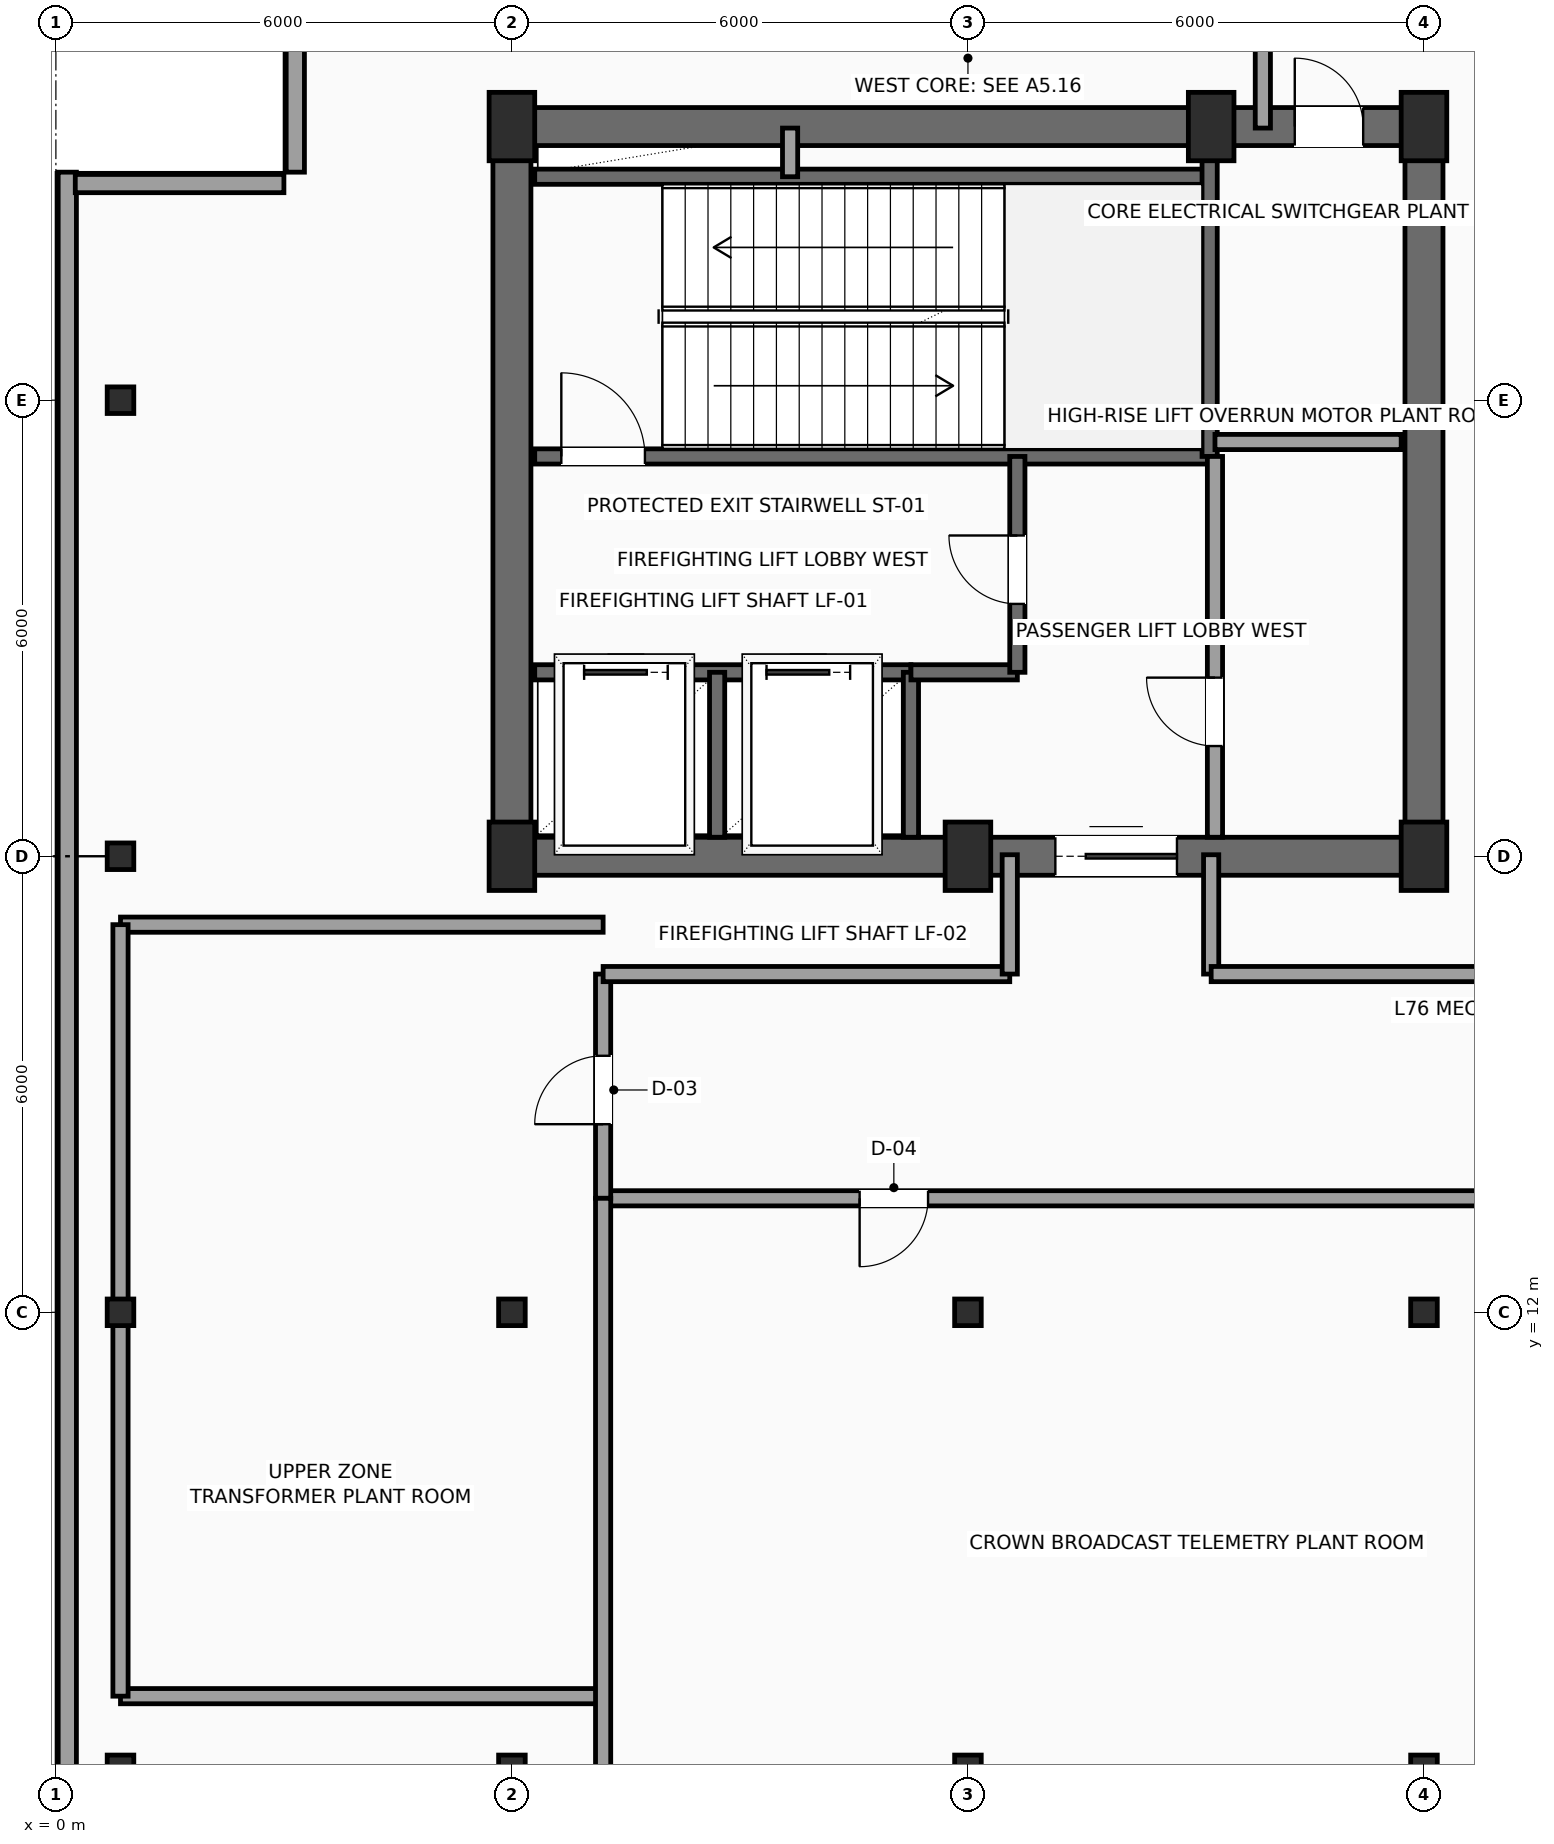
"""IFC4 building model, lengths in metres.
Left out: names, types, materials, properties, quantities, classifications, styles, units other than length and angle.
Written with IfcOpenShell. Run it as: python <this file> out.ifc"""

import sys

from ifc_helpers import new_model, si_unit, direction, frame, frame_2d, origin, origin_2d, place, context, subcontext, project, spatial, rectangle, hollow_rectangle, extrude, element, fill, save


model = new_model("IFC4")
c1 = context("Model", 3, precision=1e-05, world=origin(), true_north=direction((0.0, 1.0)))
c2 = subcontext(c1, "Body", "Model", "MODEL_VIEW")
j1 = project(units=[si_unit("LENGTHUNIT", "METRE"), si_unit("PLANEANGLEUNIT", "RADIAN")], contexts=[c1])
p1 = place(None, origin())
s1 = spatial("IfcSite", under=j1, at=p1, CompositionType="ELEMENT")
p2 = place(p1, origin())
s2 = spatial("IfcBuilding", under=s1, at=p2, CompositionType="ELEMENT")
p3 = place(p2, frame((0.0, 0.0, 300.9)))
s3 = spatial("IfcBuildingStorey", under=s2, at=p3, CompositionType="ELEMENT", Elevation=300.9)
for number, where, z_axis, x_axis in (
    (1, (6.0, 18.0, 0.0), (0.0, 0.0, 1.0), (1.0, 0.0, 0.0)),
    (2, (12.0, 18.0, 0.0), (0.0, 0.0, 1.0), (1.0, 0.0, 0.0)),
    (3, (18.0, 18.0, 0.0), (0.0, 0.0, 1.0), (1.0, 0.0, 0.0)),
    (4, (6.0, 27.6, 0.0), (0.0, 0.0, 1.0), (1.0, 0.0, 0.0)),
    (5, (15.2, 27.6, 0.0), (0.0, 0.0, 1.0), (1.0, 0.0, 0.0)),
    (6, (18.0, 27.6, 0.0), (0.0, 0.0, 1.0), (1.0, 0.0, 0.0)),
):
    element("IfcColumn", number, at=place(p3, frame(where, z_axis=z_axis, x_axis=x_axis)), inside=s3, PredefinedType="COLUMN", context=c2, shape_type="SweptSolid", body=[
        extrude(rectangle(XDim=0.6, YDim=0.9, at=origin_2d()), origin(), (0.0, 0.0, 1.0), 4.8),
    ])
for number, where, z_axis, x_axis in (
    (7, (0.85, 6.0, 0.0), (0.0, 0.0, 1.0), (1.0, 0.0, 0.0)),
    (8, (0.85, 12.0, 0.0), (0.0, 0.0, 1.0), (1.0, 0.0, 0.0)),
    (9, (0.85, 18.0, 0.0), (0.0, 0.0, 1.0), (1.0, 0.0, 0.0)),
    (10, (0.85, 24.0, 0.0), (0.0, 0.0, 1.0), (1.0, 0.0, 0.0)),
    (11, (6.0, 6.0, 0.0), (0.0, 0.0, 1.0), (1.0, 0.0, 0.0)),
    (12, (6.0, 12.0, 0.0), (0.0, 0.0, 1.0), (1.0, 0.0, 0.0)),
    (13, (12.0, 6.0, 0.0), (0.0, 0.0, 1.0), (1.0, 0.0, 0.0)),
    (14, (12.0, 12.0, 0.0), (0.0, 0.0, 1.0), (1.0, 0.0, 0.0)),
    (15, (18.0, 6.0, 0.0), (0.0, 0.0, 1.0), (1.0, 0.0, 0.0)),
    (16, (18.0, 12.0, 0.0), (0.0, 0.0, 1.0), (1.0, 0.0, 0.0)),
):
    element("IfcColumn", number, at=place(p3, frame(where, z_axis=z_axis, x_axis=x_axis)), inside=s3, PredefinedType="COLUMN", context=c2, shape_type="SweptSolid", body=[
        extrude(hollow_rectangle(XDim=0.35, YDim=0.35, WallThickness=0.016, InnerFilletRadius=0.016, OuterFilletRadius=0.032, at=origin_2d()), origin(), (0.0, 0.0, 1.0), 4.8),
    ])
p4 = place(p3, frame((0.15, 3.0, 0.0), z_axis=(0.0, 0.0, 1.0), x_axis=(0.0, 1.0, 0.0)))
e17 = element("IfcWall", 17, at=p4, inside=s3, PredefinedType="SOLIDWALL", context=c2, shape_type="SweptSolid", body=[
    extrude(rectangle(XDim=24.0, YDim=0.24, at=frame_2d((12.0, 0.0))), origin(), (0.0, 0.0, 1.0), 4.525),
])
for number, where, z_axis, x_axis in (
    (18, (0.255, 26.85, 0.0), (0.0, 0.0, 1.0), (1.0, 0.0, 0.0)),
    (19, (3.15, 27.0, 0.0), (0.0, 0.0, 1.0), (0.0, 1.0, 0.0)),
):
    element("IfcWall", number, at=place(p3, frame(where, z_axis=z_axis, x_axis=x_axis)), inside=s3, PredefinedType="SOLIDWALL", context=c2, shape_type="SweptSolid", body=[
        extrude(rectangle(XDim=2.745, YDim=0.24, at=frame_2d((1.373, 0.0))), origin(), (0.0, 0.0, 1.0), 4.525),
    ])
p5 = place(p3, frame((6.0, 18.0, 0.0), z_axis=(0.0, 0.0, 1.0), x_axis=(1.0, 0.0, 0.0)))
e20 = element("IfcWall", 20, at=p5, inside=s3, PredefinedType="SHEAR", context=c2, shape_type="SweptSolid", body=[
    extrude(rectangle(XDim=12.0, YDim=0.5, at=frame_2d((6.0, 0.0))), origin(), (0.0, 0.0, 1.0), 4.525),
])
p6 = place(p5, frame((7.15, 0.0, 0.0)))
e21 = element("IfcOpeningElement", 21, at=p6, cuts=e20, PredefinedType="OPENING", context=c2, shape_type="SweptSolid", body=[
    extrude(rectangle(XDim=1.6, YDim=2.3, at=frame_2d((0.8, 1.15))), frame((0.0, 0.26, 0.0), z_axis=(0.0, -1.0, 0.0), x_axis=(1.0, 0.0, 0.0)), (0.0, 0.0, 1.0), 0.52),
])
p7 = place(p3, frame((6.0, 27.6, 0.0), z_axis=(0.0, 0.0, 1.0), x_axis=(1.0, 0.0, 0.0)))
e22 = element("IfcWall", 22, at=p7, inside=s3, PredefinedType="SHEAR", context=c2, shape_type="SweptSolid", body=[
    extrude(rectangle(XDim=12.0, YDim=0.5, at=frame_2d((6.0, 0.0))), origin(), (0.0, 0.0, 1.0), 4.525),
])
p8 = place(p7, frame((10.3, 0.0, 0.0)))
e23 = element("IfcOpeningElement", 23, at=p8, cuts=e22, PredefinedType="OPENING", context=c2, shape_type="SweptSolid", body=[
    extrude(rectangle(XDim=0.9, YDim=2.15, at=frame_2d((0.45, 1.075))), frame((0.0, 0.26, 0.0), z_axis=(0.0, -1.0, 0.0), x_axis=(1.0, 0.0, 0.0)), (0.0, 0.0, 1.0), 0.52),
])
for number, where, z_axis, x_axis in (
    (24, (6.0, 18.0, 0.0), (0.0, 0.0, 1.0), (0.0, 1.0, 0.0)),
    (25, (18.0, 18.0, 0.0), (0.0, 0.0, 1.0), (0.0, 1.0, 0.0)),
):
    element("IfcWall", number, at=place(p3, frame(where, z_axis=z_axis, x_axis=x_axis)), inside=s3, PredefinedType="SHEAR", context=c2, shape_type="SweptSolid", body=[
        extrude(rectangle(XDim=9.6, YDim=0.5, at=frame_2d((4.8, 0.0))), origin(), (0.0, 0.0, 1.0), 4.525),
    ])
p9 = place(p3, frame((6.3, 23.26, 0.0), z_axis=(0.0, 0.0, 1.0), x_axis=(1.0, 0.0, 0.0)))
e26 = element("IfcWall", 26, at=p9, inside=s3, PredefinedType="SHEAR", context=c2, shape_type="SweptSolid", body=[
    extrude(rectangle(XDim=8.88, YDim=0.2, at=frame_2d((4.44, 0.0))), origin(), (0.0, 0.0, 1.0), 4.525),
])
p10 = place(p9, frame((0.35, 0.0, 0.0)))
e27 = element("IfcOpeningElement", 27, at=p10, cuts=e26, PredefinedType="OPENING", context=c2, shape_type="SweptSolid", body=[
    extrude(rectangle(XDim=1.1, YDim=2.2, at=frame_2d((0.55, 1.1))), frame((0.0, 0.11, 0.0), z_axis=(0.0, -1.0, 0.0), x_axis=(1.0, 0.0, 0.0)), (0.0, 0.0, 1.0), 0.22),
])
p11 = place(p3, frame((6.3, 26.94, 0.0), z_axis=(0.0, 0.0, 1.0), x_axis=(1.0, 0.0, 0.0)))
e28 = element("IfcWall", 28, at=p11, inside=s3, PredefinedType="SHEAR", context=c2, shape_type="SweptSolid", body=[
    extrude(rectangle(XDim=8.88, YDim=0.2, at=frame_2d((4.44, 0.0))), origin(), (0.0, 0.0, 1.0), 4.525),
])
p12 = place(p3, frame((15.18, 23.26, 0.0), z_axis=(0.0, 0.0, 1.0), x_axis=(0.0, 1.0, 0.0)))
e29 = element("IfcWall", 29, at=p12, inside=s3, PredefinedType="SHEAR", context=c2, shape_type="SweptSolid", body=[
    extrude(rectangle(XDim=4.04, YDim=0.2, at=frame_2d((2.02, 0.0))), origin(), (0.0, 0.0, 1.0), 4.525),
])
p13 = place(p3, frame((6.3, 20.42, 0.0), z_axis=(0.0, 0.0, 1.0), x_axis=(1.0, 0.0, 0.0)))
e30 = element("IfcWall", 30, at=p13, inside=s3, PredefinedType="SHEAR", context=c2, shape_type="SweptSolid", body=[
    extrude(rectangle(XDim=4.95, YDim=0.2, at=frame_2d((2.475, 0.0))), origin(), (0.0, 0.0, 1.0), 4.525),
])
p14 = place(p13, frame((0.65, 0.0, 0.0)))
e31 = element("IfcOpeningElement", 31, at=p14, cuts=e30, PredefinedType="OPENING", context=c2, shape_type="SweptSolid", body=[
    extrude(rectangle(XDim=1.1, YDim=2.2, at=frame_2d((0.55, 1.1))), frame((0.0, 0.11, 0.0), z_axis=(0.0, -1.0, 0.0), x_axis=(1.0, 0.0, 0.0)), (0.0, 0.0, 1.0), 0.22),
])
p15 = place(p13, frame((3.05, 0.0, 0.0)))
e32 = element("IfcOpeningElement", 32, at=p15, cuts=e30, PredefinedType="OPENING", context=c2, shape_type="SweptSolid", body=[
    extrude(rectangle(XDim=1.1, YDim=2.2, at=frame_2d((0.55, 1.1))), frame((0.0, 0.11, 0.0), z_axis=(0.0, -1.0, 0.0), x_axis=(1.0, 0.0, 0.0)), (0.0, 0.0, 1.0), 0.22),
])
for number, where, z_axis, x_axis in (
    (33, (8.7, 18.25, 0.0), (0.0, 0.0, 1.0), (0.0, 1.0, 0.0)),
    (34, (11.25, 18.25, 0.0), (0.0, 0.0, 1.0), (0.0, 1.0, 0.0)),
):
    element("IfcWall", number, at=place(p3, frame(where, z_axis=z_axis, x_axis=x_axis)), inside=s3, PredefinedType="SHEAR", context=c2, shape_type="SweptSolid", body=[
        extrude(rectangle(XDim=2.17, YDim=0.2, at=frame_2d((1.085, 0.0))), origin(), (0.0, 0.0, 1.0), 4.525),
    ])
p16 = place(p3, frame((11.25, 20.42, 0.0), z_axis=(0.0, 0.0, 1.0), x_axis=(1.0, 0.0, 0.0)))
e35 = element("IfcWall", 35, at=p16, inside=s3, PredefinedType="SHEAR", context=c2, shape_type="SweptSolid", body=[
    extrude(rectangle(XDim=1.4, YDim=0.2, at=frame_2d((0.7, 0.0))), origin(), (0.0, 0.0, 1.0), 4.525),
])
p17 = place(p3, frame((12.65, 20.42, 0.0), z_axis=(0.0, 0.0, 1.0), x_axis=(0.0, 1.0, 0.0)))
e36 = element("IfcWall", 36, at=p17, inside=s3, PredefinedType="SHEAR", context=c2, shape_type="SweptSolid", body=[
    extrude(rectangle(XDim=2.84, YDim=0.2, at=frame_2d((1.42, 0.0))), origin(), (0.0, 0.0, 1.0), 4.525),
])
p18 = place(p17, frame((0.9, 0.0, 0.0)))
e37 = element("IfcOpeningElement", 37, at=p18, cuts=e36, PredefinedType="OPENING", context=c2, shape_type="SweptSolid", body=[
    extrude(rectangle(XDim=0.9, YDim=2.15, at=frame_2d((0.45, 1.075))), frame((0.0, 0.11, 0.0), z_axis=(0.0, -1.0, 0.0), x_axis=(1.0, 0.0, 0.0)), (0.0, 0.0, 1.0), 0.22),
])
p19 = place(p3, frame((9.66, 26.94, 0.0), z_axis=(0.0, 0.0, 1.0), x_axis=(0.0, 1.0, 0.0)))
e38 = element("IfcWall", 38, at=p19, inside=s3, PredefinedType="SOLIDWALL", context=c2, shape_type="SweptSolid", body=[
    extrude(rectangle(XDim=0.64, YDim=0.2, at=frame_2d((0.32, 0.0))), origin(), (0.0, 0.0, 1.0), 4.525),
])
p20 = place(p3, frame((15.25, 18.25, 0.0), z_axis=(0.0, 0.0, 1.0), x_axis=(0.0, 1.0, 0.0)))
e39 = element("IfcWall", 39, at=p20, inside=s3, PredefinedType="SOLIDWALL", context=c2, shape_type="SweptSolid", body=[
    extrude(rectangle(XDim=5.01, YDim=0.2, at=frame_2d((2.505, 0.0))), origin(), (0.0, 0.0, 1.0), 4.525),
])
p21 = place(p20, frame((1.2, 0.0, 0.0)))
e40 = element("IfcOpeningElement", 40, at=p21, cuts=e39, PredefinedType="OPENING", context=c2, shape_type="SweptSolid", body=[
    extrude(rectangle(XDim=0.9, YDim=2.15, at=frame_2d((0.45, 1.075))), frame((0.0, 0.11, 0.0), z_axis=(0.0, -1.0, 0.0), x_axis=(1.0, 0.0, 0.0)), (0.0, 0.0, 1.0), 0.22),
])
p22 = place(p3, frame((15.25, 23.45, 0.0), z_axis=(0.0, 0.0, 1.0), x_axis=(1.0, 0.0, 0.0)))
e41 = element("IfcWall", 41, at=p22, inside=s3, PredefinedType="SOLIDWALL", context=c2, shape_type="SweptSolid", body=[
    extrude(rectangle(XDim=2.45, YDim=0.2, at=frame_2d((1.225, 0.0))), origin(), (0.0, 0.0, 1.0), 4.525),
])
p23 = place(p3, frame((20.75, 13.5, 0.0), z_axis=(0.0, 0.0, 1.0), x_axis=(-1.0, 0.0, 0.0)))
e42 = element("IfcWall", 42, at=p23, inside=s3, PredefinedType="SOLIDWALL", context=c2, shape_type="SweptSolid", body=[
    extrude(rectangle(XDim=13.55, YDim=0.2, at=frame_2d((6.775, 0.0))), origin(), (0.0, 0.0, 1.0), 4.525),
])
p24 = place(p23, frame((9.275, 0.0, 0.0)))
e43 = element("IfcOpeningElement", 43, at=p24, cuts=e42, PredefinedType="OPENING", context=c2, shape_type="SweptSolid", body=[
    extrude(rectangle(XDim=0.9, YDim=2.15, at=frame_2d((0.45, 1.075))), frame((0.0, 0.11, 0.0), z_axis=(0.0, -1.0, 0.0), x_axis=(1.0, 0.0, 0.0)), (0.0, 0.0, 1.0), 0.22),
])
p25 = place(p3, frame((7.2, 13.5, 0.0), z_axis=(0.0, 0.0, 1.0), x_axis=(0.0, 1.0, 0.0)))
e44 = element("IfcWall", 44, at=p25, inside=s3, PredefinedType="SOLIDWALL", context=c2, shape_type="SweptSolid", body=[
    extrude(rectangle(XDim=2.95, YDim=0.2, at=frame_2d((1.475, 0.0))), origin(), (0.0, 0.0, 1.0), 4.525),
])
p26 = place(p25, frame((0.975, 0.0, 0.0)))
e45 = element("IfcOpeningElement", 45, at=p26, cuts=e44, PredefinedType="OPENING", context=c2, shape_type="SweptSolid", body=[
    extrude(rectangle(XDim=0.9, YDim=2.15, at=frame_2d((0.45, 1.075))), frame((0.0, 0.11, 0.0), z_axis=(0.0, -1.0, 0.0), x_axis=(1.0, 0.0, 0.0)), (0.0, 0.0, 1.0), 0.22),
])
p27 = place(p3, frame((7.2, 16.45, 0.0), z_axis=(0.0, 0.0, 1.0), x_axis=(1.0, 0.0, 0.0)))
e46 = element("IfcWall", 46, at=p27, inside=s3, PredefinedType="SOLIDWALL", context=c2, shape_type="SweptSolid", body=[
    extrude(rectangle(XDim=5.35, YDim=0.2, at=frame_2d((2.675, 0.0))), origin(), (0.0, 0.0, 1.0), 4.525),
])
for number, where, z_axis, x_axis in (
    (47, (12.55, 16.45, 0.0), (0.0, 0.0, 1.0), (0.0, 1.0, 0.0)),
    (48, (15.2, 18.02, 0.0), (0.0, 0.0, 1.0), (0.0, -1.0, 0.0)),
):
    element("IfcWall", number, at=place(p3, frame(where, z_axis=z_axis, x_axis=x_axis)), inside=s3, PredefinedType="SOLIDWALL", context=c2, shape_type="SweptSolid", body=[
        extrude(rectangle(XDim=1.57, YDim=0.2, at=frame_2d((0.785, 0.0))), origin(), (0.0, 0.0, 1.0), 4.525),
    ])
p28 = place(p3, frame((15.2, 16.45, 0.0), z_axis=(0.0, 0.0, 1.0), x_axis=(1.0, 0.0, 0.0)))
e49 = element("IfcWall", 49, at=p28, inside=s3, PredefinedType="SOLIDWALL", context=c2, shape_type="SweptSolid", body=[
    extrude(rectangle(XDim=3.75, YDim=0.2, at=frame_2d((1.875, 0.0))), origin(), (0.0, 0.0, 1.0), 4.525),
])
p29 = place(p3, frame((15.88, 27.58, 0.0), z_axis=(0.0, 0.0, 1.0), x_axis=(0.0, 1.0, 0.0)))
e50 = element("IfcWall", 50, at=p29, inside=s3, PredefinedType="SOLIDWALL", context=c2, shape_type="SweptSolid", body=[
    extrude(rectangle(XDim=2.12, YDim=0.2, at=frame_2d((1.06, 0.0))), origin(), (0.0, 0.0, 1.0), 4.525),
])
for number, where, z_axis, x_axis in (
    (51, (0.85, 6.95, 0.0), (0.0, 0.0, 1.0), (1.0, 0.0, 0.0)),
    (52, (0.85, 17.1, 0.0), (0.0, 0.0, 1.0), (1.0, 0.0, 0.0)),
):
    element("IfcWall", number, at=place(p3, frame(where, z_axis=z_axis, x_axis=x_axis)), inside=s3, PredefinedType="SOLIDWALL", context=c2, shape_type="SweptSolid", body=[
        extrude(rectangle(XDim=6.35, YDim=0.2, at=frame_2d((3.175, 0.0))), origin(), (0.0, 0.0, 1.0), 4.525),
    ])
p30 = place(p3, frame((0.85, 6.95, 0.0), z_axis=(0.0, 0.0, 1.0), x_axis=(0.0, 1.0, 0.0)))
e53 = element("IfcWall", 53, at=p30, inside=s3, PredefinedType="SOLIDWALL", context=c2, shape_type="SweptSolid", body=[
    extrude(rectangle(XDim=10.15, YDim=0.2, at=frame_2d((5.075, 0.0))), origin(), (0.0, 0.0, 1.0), 4.217),
])
p31 = place(p3, frame((7.2, 1.75, 0.0), z_axis=(0.0, 0.0, 1.0), x_axis=(0.0, 1.0, 0.0)))
e54 = element("IfcWall", 54, at=p31, inside=s3, PredefinedType="SOLIDWALL", context=c2, shape_type="SweptSolid", body=[
    extrude(rectangle(XDim=11.75, YDim=0.2, at=frame_2d((5.875, 0.0))), origin(), (0.0, 0.0, 1.0), 4.525),
])
p32 = place(p6, origin())
e55 = element("IfcDoor", 55, at=p32, inside=s3, OperationType="DOUBLE_DOOR_SLIDING", PredefinedType="DOOR", context=c2, shape_type="SweptSolid", body=[
    extrude(rectangle(XDim=1.6, YDim=2.3, at=frame_2d((0.8, 1.15))), frame((0.0, 0.025, 0.0), z_axis=(0.0, -1.0, 0.0), x_axis=(1.0, 0.0, 0.0)), (0.0, 0.0, 1.0), 0.05),
])
fill(e21, e55)
p33 = place(p8, origin())
e56 = element("IfcDoor", 56, at=p33, inside=s3, OperationType="SINGLE_SWING_LEFT", PredefinedType="DOOR", context=c2, shape_type="SweptSolid", body=[
    extrude(rectangle(XDim=0.9, YDim=2.15, at=frame_2d((0.45, 1.075))), frame((0.0, 0.025, 0.0), z_axis=(0.0, -1.0, 0.0), x_axis=(1.0, 0.0, 0.0)), (0.0, 0.0, 1.0), 0.05),
])
fill(e23, e56)
p34 = place(p10, origin())
e57 = element("IfcDoor", 57, at=p34, inside=s3, OperationType="SINGLE_SWING_LEFT", PredefinedType="DOOR", context=c2, shape_type="SweptSolid", body=[
    extrude(rectangle(XDim=1.1, YDim=2.2, at=frame_2d((0.55, 1.1))), frame((0.0, 0.025, 0.0), z_axis=(0.0, -1.0, 0.0), x_axis=(1.0, 0.0, 0.0)), (0.0, 0.0, 1.0), 0.05),
])
fill(e27, e57)
p35 = place(p14, origin())
e58 = element("IfcDoor", 58, at=p35, inside=s3, OperationType="SLIDING_TO_LEFT", PredefinedType="DOOR", context=c2, shape_type="SweptSolid", body=[
    extrude(rectangle(XDim=1.1, YDim=2.2, at=frame_2d((0.55, 1.1))), frame((0.0, 0.025, 0.0), z_axis=(0.0, -1.0, 0.0), x_axis=(1.0, 0.0, 0.0)), (0.0, 0.0, 1.0), 0.05),
])
fill(e31, e58)
p36 = place(p15, origin())
e59 = element("IfcDoor", 59, at=p36, inside=s3, OperationType="SLIDING_TO_LEFT", PredefinedType="DOOR", context=c2, shape_type="SweptSolid", body=[
    extrude(rectangle(XDim=1.1, YDim=2.2, at=frame_2d((0.55, 1.1))), frame((0.0, 0.025, 0.0), z_axis=(0.0, -1.0, 0.0), x_axis=(1.0, 0.0, 0.0)), (0.0, 0.0, 1.0), 0.05),
])
fill(e32, e59)
p37 = place(p18, origin())
e60 = element("IfcDoor", 60, at=p37, inside=s3, OperationType="SINGLE_SWING_RIGHT", PredefinedType="DOOR", context=c2, shape_type="SweptSolid", body=[
    extrude(rectangle(XDim=0.9, YDim=2.15, at=frame_2d((0.45, 1.075))), frame((0.0, 0.025, 0.0), z_axis=(0.0, -1.0, 0.0), x_axis=(1.0, 0.0, 0.0)), (0.0, 0.0, 1.0), 0.05),
])
fill(e37, e60)
p38 = place(p21, origin())
e61 = element("IfcDoor", 61, at=p38, inside=s3, OperationType="SINGLE_SWING_RIGHT", PredefinedType="DOOR", context=c2, shape_type="SweptSolid", body=[
    extrude(rectangle(XDim=0.9, YDim=2.15, at=frame_2d((0.45, 1.075))), frame((0.0, 0.025, 0.0), z_axis=(0.0, -1.0, 0.0), x_axis=(1.0, 0.0, 0.0)), (0.0, 0.0, 1.0), 0.05),
])
fill(e40, e61)
p39 = place(p24, origin())
e62 = element("IfcDoor", 62, at=p39, inside=s3, OperationType="SINGLE_SWING_RIGHT", PredefinedType="DOOR", context=c2, shape_type="SweptSolid", body=[
    extrude(rectangle(XDim=0.9, YDim=2.15, at=frame_2d((0.45, 1.075))), frame((0.0, 0.025, 0.0), z_axis=(0.0, -1.0, 0.0), x_axis=(1.0, 0.0, 0.0)), (0.0, 0.0, 1.0), 0.05),
])
fill(e43, e62)
p40 = place(p26, origin())
e63 = element("IfcDoor", 63, at=p40, inside=s3, OperationType="SINGLE_SWING_LEFT", PredefinedType="DOOR", context=c2, shape_type="SweptSolid", body=[
    extrude(rectangle(XDim=0.9, YDim=2.15, at=frame_2d((0.45, 1.075))), frame((0.0, 0.025, 0.0), z_axis=(0.0, -1.0, 0.0), x_axis=(1.0, 0.0, 0.0)), (0.0, 0.0, 1.0), 0.05),
])
fill(e45, e63)
save(model, sys.argv[1])
